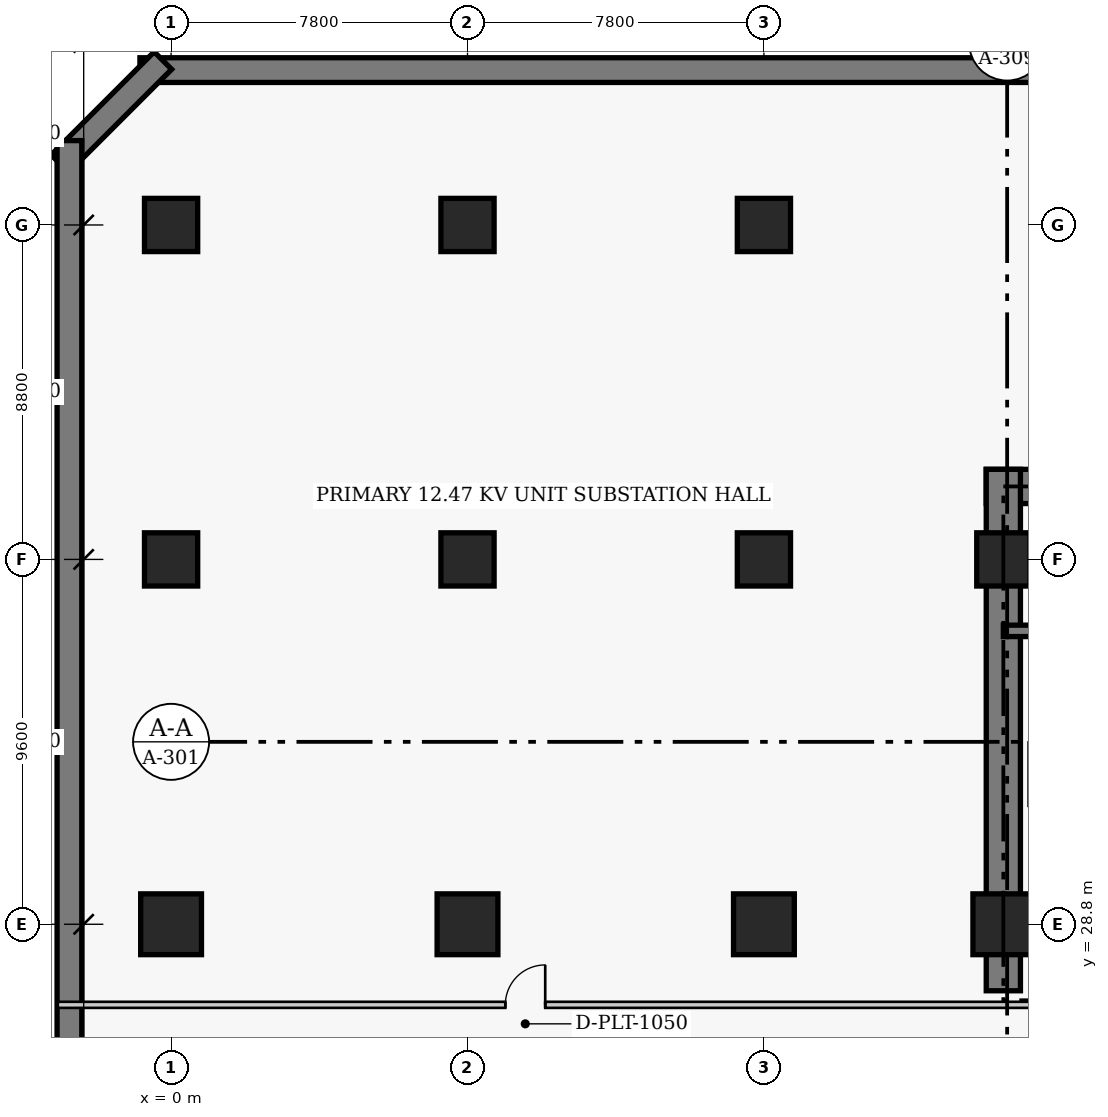
"""IFC4 building model, lengths in metres.
Left out: names, types, materials, properties, quantities, classifications, styles, units other than length and angle.
Written with IfcOpenShell. Run it as: python <this file> out.ifc"""

import sys

from ifc_helpers import new_model, si_unit, direction, frame, frame_2d, origin, origin_2d, place, context, subcontext, project, spatial, rectangle, extrude, element, fill, save


model = new_model("IFC4")
c1 = context("Model", 3, precision=1e-05, world=origin(), true_north=direction((0.0, 1.0)))
c2 = subcontext(c1, "Body", "Model", "MODEL_VIEW")
j1 = project(units=[si_unit("LENGTHUNIT", "METRE"), si_unit("PLANEANGLEUNIT", "RADIAN")], contexts=[c1])
p1 = place(None, origin())
s1 = spatial("IfcSite", under=j1, at=p1, CompositionType="ELEMENT")
p2 = place(p1, origin())
s2 = spatial("IfcBuilding", under=s1, at=p2, CompositionType="ELEMENT")
p3 = place(p2, frame((0.0, 0.0, -9.0)))
s3 = spatial("IfcBuildingStorey", under=s2, at=p3, CompositionType="ELEMENT", Elevation=-9.0)
p4 = place(p3, frame((78.82, 51.275, 0.0), z_axis=(0.0, 0.0, 1.0), x_axis=(-1.0, 0.0, 0.0)))
e1 = element("IfcWall", 1, at=p4, inside=s3, PredefinedType="USERDEFINED", context=c2, shape_type="SweptSolid", body=[
    extrude(rectangle(XDim=79.64, YDim=0.65, at=frame_2d((39.82, 0.0))), origin(), (0.0, 0.0, 1.0), 4.18),
])
p5 = place(p3, frame((-0.215, 51.526, 0.0), z_axis=(0.0, 0.0, 1.0), x_axis=(-0.707106781187, -0.707106781187, 0.0)))
e2 = element("IfcWall", 2, at=p5, inside=s3, PredefinedType="USERDEFINED", context=c2, shape_type="SweptSolid", body=[
    extrude(rectangle(XDim=3.834, YDim=0.65, at=frame_2d((1.917, 0.0))), origin(), (0.0, 0.0, 1.0), 4.18),
])
p6 = place(p3, frame((-2.675, 49.42, 0.0), z_axis=(0.0, 0.0, 1.0), x_axis=(0.0, -1.0, 0.0)))
e3 = element("IfcWall", 3, at=p6, inside=s3, PredefinedType="USERDEFINED", context=c2, shape_type="SweptSolid", body=[
    extrude(rectangle(XDim=46.84, YDim=0.65, at=frame_2d((23.42, 0.0))), origin(), (0.0, 0.0, 1.0), 4.18),
])
p7 = place(p3, frame((21.45, 40.32, 0.0), z_axis=(0.0, 0.0, 1.0), x_axis=(1.0, 0.0, 0.0)))
e4 = element("IfcWall", 4, at=p7, inside=s3, PredefinedType="SHEAR", context=c2, shape_type="SweptSolid", body=[
    extrude(rectangle(XDim=14.4, YDim=0.9, at=frame_2d((7.2, 0.0))), origin(), (0.0, 0.0, 1.0), 4.5),
])
p8 = place(p3, frame((21.9, 27.05, 0.0), z_axis=(0.0, 0.0, 1.0), x_axis=(0.0, 1.0, 0.0)))
e5 = element("IfcWall", 5, at=p8, inside=s3, PredefinedType="SHEAR", context=c2, shape_type="SweptSolid", body=[
    extrude(rectangle(XDim=13.72, YDim=0.9, at=frame_2d((6.86, 0.0))), origin(), (0.0, 0.0, 1.0), 4.5),
])
p9 = place(p3, frame((21.9, 36.52, 0.0), z_axis=(0.0, 0.0, 1.0), x_axis=(1.0, 0.0, 0.0)))
e6 = element("IfcWall", 6, at=p9, inside=s3, PredefinedType="SHEAR", context=c2, shape_type="SweptSolid", body=[
    extrude(rectangle(XDim=8.32, YDim=0.3, at=frame_2d((4.16, 0.0))), origin(), (0.0, 0.0, 1.0), 4.5),
])
p10 = place(p9, frame((0.9, 0.0, 0.0)))
e7 = element("IfcOpeningElement", 7, at=p10, cuts=e6, PredefinedType="OPENING", context=c2, shape_type="SweptSolid", body=[
    extrude(rectangle(XDim=1.1, YDim=2.15, at=frame_2d((0.55, 1.075))), frame((0.0, 0.16, 0.0), z_axis=(0.0, -1.0, 0.0), x_axis=(1.0, 0.0, 0.0)), (0.0, 0.0, 1.0), 0.32),
])
p11 = place(p3, frame((0.0, 28.8, 0.0), z_axis=(0.0, 0.0, 1.0), x_axis=(1.0, 0.0, 0.0)))
e8 = element("IfcColumn", 8, at=p11, inside=s3, PredefinedType="COLUMN", context=c2, shape_type="SweptSolid", body=[
    extrude(rectangle(XDim=1.6, YDim=1.6, at=origin_2d()), origin(), (0.0, 0.0, 1.0), 4.5),
])
for number, where, z_axis, x_axis in (
    (9, (0.0, 38.4, 0.0), (0.0, 0.0, 1.0), (1.0, 0.0, 0.0)),
    (10, (0.0, 47.2, 0.0), (0.0, 0.0, 1.0), (1.0, 0.0, 0.0)),
):
    element("IfcColumn", number, at=place(p3, frame(where, z_axis=z_axis, x_axis=x_axis)), inside=s3, PredefinedType="COLUMN", context=c2, shape_type="SweptSolid", body=[
        extrude(rectangle(XDim=1.4, YDim=1.4, at=origin_2d()), origin(), (0.0, 0.0, 1.0), 4.5),
    ])
p12 = place(p3, frame((7.8, 28.8, 0.0), z_axis=(0.0, 0.0, 1.0), x_axis=(1.0, 0.0, 0.0)))
e11 = element("IfcColumn", 11, at=p12, inside=s3, PredefinedType="COLUMN", context=c2, shape_type="SweptSolid", body=[
    extrude(rectangle(XDim=1.6, YDim=1.6, at=origin_2d()), origin(), (0.0, 0.0, 1.0), 4.5),
])
for number, where, z_axis, x_axis in (
    (12, (7.8, 38.4, 0.0), (0.0, 0.0, 1.0), (1.0, 0.0, 0.0)),
    (13, (7.8, 47.2, 0.0), (0.0, 0.0, 1.0), (1.0, 0.0, 0.0)),
):
    element("IfcColumn", number, at=place(p3, frame(where, z_axis=z_axis, x_axis=x_axis)), inside=s3, PredefinedType="COLUMN", context=c2, shape_type="SweptSolid", body=[
        extrude(rectangle(XDim=1.4, YDim=1.4, at=origin_2d()), origin(), (0.0, 0.0, 1.0), 4.5),
    ])
p13 = place(p3, frame((15.6, 28.8, 0.0), z_axis=(0.0, 0.0, 1.0), x_axis=(1.0, 0.0, 0.0)))
e14 = element("IfcColumn", 14, at=p13, inside=s3, PredefinedType="COLUMN", context=c2, shape_type="SweptSolid", body=[
    extrude(rectangle(XDim=1.6, YDim=1.6, at=origin_2d()), origin(), (0.0, 0.0, 1.0), 4.5),
])
for number, where, z_axis, x_axis in (
    (15, (15.6, 38.4, 0.0), (0.0, 0.0, 1.0), (1.0, 0.0, 0.0)),
    (16, (15.6, 47.2, 0.0), (0.0, 0.0, 1.0), (1.0, 0.0, 0.0)),
):
    element("IfcColumn", number, at=place(p3, frame(where, z_axis=z_axis, x_axis=x_axis)), inside=s3, PredefinedType="COLUMN", context=c2, shape_type="SweptSolid", body=[
        extrude(rectangle(XDim=1.4, YDim=1.4, at=origin_2d()), origin(), (0.0, 0.0, 1.0), 4.5),
    ])
p14 = place(p3, frame((21.9, 28.8, 0.0), z_axis=(0.0, 0.0, 1.0), x_axis=(1.0, 0.0, 0.0)))
e17 = element("IfcColumn", 17, at=p14, inside=s3, PredefinedType="COLUMN", context=c2, shape_type="SweptSolid", body=[
    extrude(rectangle(XDim=1.6, YDim=1.6, at=origin_2d()), origin(), (0.0, 0.0, 1.0), 4.5),
])
p15 = place(p3, frame((21.9, 38.4, 0.0), z_axis=(0.0, 0.0, 1.0), x_axis=(1.0, 0.0, 0.0)))
e18 = element("IfcColumn", 18, at=p15, inside=s3, PredefinedType="COLUMN", context=c2, shape_type="SweptSolid", body=[
    extrude(rectangle(XDim=1.4, YDim=1.4, at=origin_2d()), origin(), (0.0, 0.0, 1.0), 4.5),
])
p16 = place(p3, frame((-2.98, 26.68, 0.0), z_axis=(0.0, 0.0, 1.0), x_axis=(1.0, 0.0, 0.0)))
e19 = element("IfcWall", 19, at=p16, inside=s3, PredefinedType="PARTITIONING", context=c2, shape_type="SweptSolid", body=[
    extrude(rectangle(XDim=83.96, YDim=0.16, at=frame_2d((41.98, 0.0))), origin(), (0.0, 0.0, 1.0), 4.18),
])
p17 = place(p16, frame((37.016, 0.0, 0.0)))
e20 = element("IfcOpeningElement", 20, at=p17, cuts=e19, PredefinedType="OPENING", context=c2, shape_type="SweptSolid", body=[
    extrude(rectangle(XDim=1.8, YDim=2.2, at=frame_2d((0.9, 1.1))), frame((0.0, 0.09, 0.0), z_axis=(0.0, -1.0, 0.0), x_axis=(1.0, 0.0, 0.0)), (0.0, 0.0, 1.0), 0.18),
])
p18 = place(p16, frame((11.775, 0.0, 0.0)))
e21 = element("IfcOpeningElement", 21, at=p18, cuts=e19, PredefinedType="OPENING", context=c2, shape_type="SweptSolid", body=[
    extrude(rectangle(XDim=1.05, YDim=2.15, at=frame_2d((0.525, 1.075))), frame((0.0, 0.09, 0.0), z_axis=(0.0, -1.0, 0.0), x_axis=(1.0, 0.0, 0.0)), (0.0, 0.0, 1.0), 0.18),
])
p19 = place(p16, frame((70.925, 0.0, 0.0)))
e22 = element("IfcOpeningElement", 22, at=p19, cuts=e19, PredefinedType="OPENING", context=c2, shape_type="SweptSolid", body=[
    extrude(rectangle(XDim=1.05, YDim=2.15, at=frame_2d((0.525, 1.075))), frame((0.0, 0.09, 0.0), z_axis=(0.0, -1.0, 0.0), x_axis=(1.0, 0.0, 0.0)), (0.0, 0.0, 1.0), 0.18),
])
p20 = place(p18, origin())
e23 = element("IfcDoor", 23, at=p20, inside=s3, OperationType="SINGLE_SWING_RIGHT", PredefinedType="DOOR", context=c2, shape_type="SweptSolid", body=[
    extrude(rectangle(XDim=1.05, YDim=2.15, at=frame_2d((0.525, 1.075))), frame((0.0, 0.025, 0.0), z_axis=(0.0, -1.0, 0.0), x_axis=(1.0, 0.0, 0.0)), (0.0, 0.0, 1.0), 0.05),
])
fill(e21, e23)
save(model, sys.argv[1])
